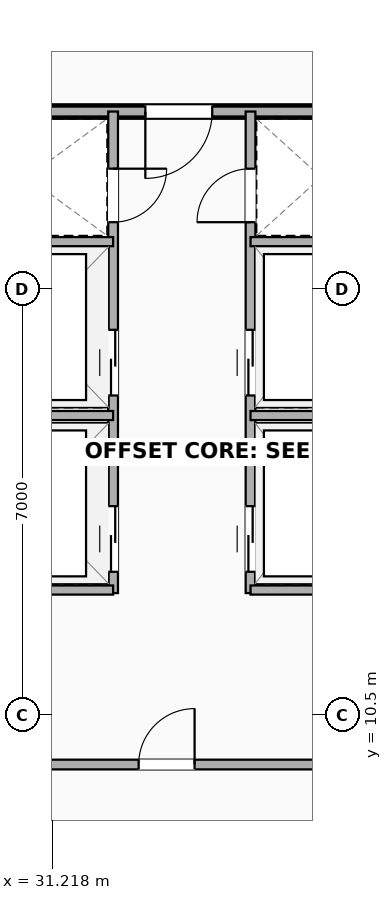
"""IFC4 building model, lengths in metres.
Left out: names, types, materials, properties, quantities, classifications, styles, units other than length and angle.
Written with IfcOpenShell. Run it as: python <this file> out.ifc"""

import sys

from ifc_helpers import new_model, si_unit, direction, frame, frame_2d, origin, place, context, subcontext, project, spatial, rectangle, extrude, element, fill, save


model = new_model("IFC4")
c1 = context("Model", 3, precision=1e-05, world=origin(), true_north=direction((0.0, 1.0)))
c2 = subcontext(c1, "Body", "Model", "MODEL_VIEW")
j1 = project(units=[si_unit("LENGTHUNIT", "METRE"), si_unit("PLANEANGLEUNIT", "RADIAN")], contexts=[c1])
p1 = place(None, origin())
s1 = spatial("IfcSite", under=j1, at=p1, CompositionType="ELEMENT")
p2 = place(p1, origin())
s2 = spatial("IfcBuilding", under=s1, at=p2, CompositionType="ELEMENT")
p3 = place(p2, frame((0.0, 0.0, 91.7)))
s3 = spatial("IfcBuildingStorey", under=s2, at=p3, CompositionType="ELEMENT", Elevation=91.7)
p4 = place(p3, frame((29.2, 20.42, 0.0), z_axis=(0.0, 0.0, 1.0), x_axis=(1.0, 0.0, 0.0)))
e1 = element("IfcWall", 1, at=p4, inside=s3, PredefinedType="PARTITIONING", context=c2, shape_type="SweptSolid", body=[
    extrude(rectangle(XDim=7.8, YDim=0.2, at=frame_2d((3.9, 0.0))), origin(), (0.0, 0.0, 1.0), 2.313),
])
p5 = place(p4, frame((3.55, 0.0, 0.0)))
e2 = element("IfcOpeningElement", 2, at=p5, cuts=e1, PredefinedType="OPENING", context=c2, shape_type="SweptSolid", body=[
    extrude(rectangle(XDim=1.1, YDim=2.15, at=frame_2d((0.55, 1.075))), frame((0.0, 0.11, 0.0), z_axis=(0.0, -1.0, 0.0), x_axis=(1.0, 0.0, 0.0)), (0.0, 0.0, 1.0), 0.22),
])
p6 = place(p3, frame((29.45, 9.68, 0.0), z_axis=(0.0, 0.0, 1.0), x_axis=(1.0, 0.0, 0.0)))
e3 = element("IfcWall", 3, at=p6, inside=s3, PredefinedType="PARTITIONING", context=c2, shape_type="SweptSolid", body=[
    extrude(rectangle(XDim=7.3, YDim=0.16, at=frame_2d((3.65, 0.0))), origin(), (0.0, 0.0, 1.0), 3.24),
])
p7 = place(p6, frame((4.11, 0.0, 0.0), z_axis=(0.0, 0.0, 1.0), x_axis=(-1.0, 0.0, 0.0)))
e4 = element("IfcOpeningElement", 4, at=p7, cuts=e3, PredefinedType="OPENING", context=c2, shape_type="SweptSolid", body=[
    extrude(rectangle(XDim=0.92, YDim=2.08, at=frame_2d((0.46, 1.04))), frame((0.0, 0.09, 0.0), z_axis=(0.0, -1.0, 0.0), x_axis=(1.0, 0.0, 0.0)), (0.0, 0.0, 1.0), 0.18),
])
p8 = place(p3, frame((32.22, 12.5, 0.0), z_axis=(0.0, 0.0, 1.0), x_axis=(0.0, 1.0, 0.0)))
e5 = element("IfcWall", 5, at=p8, inside=s3, PredefinedType="PARTITIONING", context=c2, shape_type="SweptSolid", body=[
    extrude(rectangle(XDim=7.92, YDim=0.16, at=frame_2d((3.96, 0.0))), origin(), (0.0, 0.0, 1.0), 2.614),
])
p9 = place(p8, frame((1.43, 0.0, 0.0), z_axis=(0.0, 0.0, 1.0), x_axis=(-1.0, 0.0, 0.0)))
e6 = element("IfcOpeningElement", 6, at=p9, cuts=e5, PredefinedType="OPENING", context=c2, shape_type="SweptSolid", body=[
    extrude(rectangle(XDim=1.08, YDim=2.16, at=frame_2d((0.54, 1.08))), frame((0.0, 0.09, 0.0), z_axis=(0.0, -1.0, 0.0), x_axis=(1.0, 0.0, 0.0)), (0.0, 0.0, 1.0), 0.18),
])
p10 = place(p8, frame((4.33, 0.0, 0.0), z_axis=(0.0, 0.0, 1.0), x_axis=(-1.0, 0.0, 0.0)))
e7 = element("IfcOpeningElement", 7, at=p10, cuts=e5, PredefinedType="OPENING", context=c2, shape_type="SweptSolid", body=[
    extrude(rectangle(XDim=1.08, YDim=2.16, at=frame_2d((0.54, 1.08))), frame((0.0, 0.09, 0.0), z_axis=(0.0, -1.0, 0.0), x_axis=(1.0, 0.0, 0.0)), (0.0, 0.0, 1.0), 0.18),
])
p11 = place(p8, frame((6.1, 0.0, 0.0)))
e8 = element("IfcOpeningElement", 8, at=p11, cuts=e5, PredefinedType="OPENING", context=c2, shape_type="SweptSolid", body=[
    extrude(rectangle(XDim=0.88, YDim=2.08, at=frame_2d((0.44, 1.04))), frame((0.0, 0.09, 0.0), z_axis=(0.0, -1.0, 0.0), x_axis=(1.0, 0.0, 0.0)), (0.0, 0.0, 1.0), 0.18),
])
p12 = place(p3, frame((34.48, 12.5, 0.0), z_axis=(0.0, 0.0, 1.0), x_axis=(0.0, 1.0, 0.0)))
e9 = element("IfcWall", 9, at=p12, inside=s3, PredefinedType="PARTITIONING", context=c2, shape_type="SweptSolid", body=[
    extrude(rectangle(XDim=7.92, YDim=0.16, at=frame_2d((3.96, 0.0))), origin(), (0.0, 0.0, 1.0), 2.614),
])
p13 = place(p12, frame((0.35, 0.0, 0.0)))
e10 = element("IfcOpeningElement", 10, at=p13, cuts=e9, PredefinedType="OPENING", context=c2, shape_type="SweptSolid", body=[
    extrude(rectangle(XDim=1.08, YDim=2.16, at=frame_2d((0.54, 1.08))), frame((0.0, 0.09, 0.0), z_axis=(0.0, -1.0, 0.0), x_axis=(1.0, 0.0, 0.0)), (0.0, 0.0, 1.0), 0.18),
])
p14 = place(p12, frame((3.25, 0.0, 0.0)))
e11 = element("IfcOpeningElement", 11, at=p14, cuts=e9, PredefinedType="OPENING", context=c2, shape_type="SweptSolid", body=[
    extrude(rectangle(XDim=1.08, YDim=2.16, at=frame_2d((0.54, 1.08))), frame((0.0, 0.09, 0.0), z_axis=(0.0, -1.0, 0.0), x_axis=(1.0, 0.0, 0.0)), (0.0, 0.0, 1.0), 0.18),
])
p15 = place(p12, frame((6.98, 0.0, 0.0), z_axis=(0.0, 0.0, 1.0), x_axis=(-1.0, 0.0, 0.0)))
e12 = element("IfcOpeningElement", 12, at=p15, cuts=e9, PredefinedType="OPENING", context=c2, shape_type="SweptSolid", body=[
    extrude(rectangle(XDim=0.88, YDim=2.08, at=frame_2d((0.44, 1.04))), frame((0.0, 0.09, 0.0), z_axis=(0.0, -1.0, 0.0), x_axis=(1.0, 0.0, 0.0)), (0.0, 0.0, 1.0), 0.18),
])
p16 = place(p3, frame((29.45, 12.55, 0.0), z_axis=(0.0, 0.0, 1.0), x_axis=(1.0, 0.0, 0.0)))
e13 = element("IfcWall", 13, at=p16, inside=s3, PredefinedType="PARTITIONING", context=c2, shape_type="SweptSolid", body=[
    extrude(rectangle(XDim=2.77, YDim=0.15, at=frame_2d((1.385, 0.0))), origin(), (0.0, 0.0, 1.0), 3.24),
])
p17 = place(p3, frame((34.48, 12.55, 0.0), z_axis=(0.0, 0.0, 1.0), x_axis=(1.0, 0.0, 0.0)))
e14 = element("IfcWall", 14, at=p17, inside=s3, PredefinedType="PARTITIONING", context=c2, shape_type="SweptSolid", body=[
    extrude(rectangle(XDim=2.27, YDim=0.15, at=frame_2d((1.135, 0.0))), origin(), (0.0, 0.0, 1.0), 3.24),
])
p18 = place(p3, frame((29.45, 15.42, 0.0), z_axis=(0.0, 0.0, 1.0), x_axis=(1.0, 0.0, 0.0)))
e15 = element("IfcWall", 15, at=p18, inside=s3, PredefinedType="PARTITIONING", context=c2, shape_type="SweptSolid", body=[
    extrude(rectangle(XDim=2.77, YDim=0.15, at=frame_2d((1.385, 0.0))), origin(), (0.0, 0.0, 1.0), 3.24),
])
p19 = place(p3, frame((34.48, 15.42, 0.0), z_axis=(0.0, 0.0, 1.0), x_axis=(1.0, 0.0, 0.0)))
e16 = element("IfcWall", 16, at=p19, inside=s3, PredefinedType="PARTITIONING", context=c2, shape_type="SweptSolid", body=[
    extrude(rectangle(XDim=2.27, YDim=0.15, at=frame_2d((1.135, 0.0))), origin(), (0.0, 0.0, 1.0), 3.24),
])
p20 = place(p3, frame((29.45, 18.28, 0.0), z_axis=(0.0, 0.0, 1.0), x_axis=(1.0, 0.0, 0.0)))
e17 = element("IfcWall", 17, at=p20, inside=s3, PredefinedType="PARTITIONING", context=c2, shape_type="SweptSolid", body=[
    extrude(rectangle(XDim=2.77, YDim=0.15, at=frame_2d((1.385, 0.0))), origin(), (0.0, 0.0, 1.0), 3.24),
])
p21 = place(p3, frame((34.48, 18.28, 0.0), z_axis=(0.0, 0.0, 1.0), x_axis=(1.0, 0.0, 0.0)))
e18 = element("IfcWall", 18, at=p21, inside=s3, PredefinedType="PARTITIONING", context=c2, shape_type="SweptSolid", body=[
    extrude(rectangle(XDim=2.27, YDim=0.15, at=frame_2d((1.135, 0.0))), origin(), (0.0, 0.0, 1.0), 3.24),
])
p22 = place(p5, origin())
e19 = element("IfcDoor", 19, at=p22, inside=s3, OperationType="SINGLE_SWING_LEFT", PredefinedType="DOOR", context=c2, shape_type="SweptSolid", body=[
    extrude(rectangle(XDim=1.1, YDim=2.15, at=frame_2d((0.55, 1.075))), frame((0.0, 0.025, 0.0), z_axis=(0.0, -1.0, 0.0), x_axis=(1.0, 0.0, 0.0)), (0.0, 0.0, 1.0), 0.05),
])
fill(e2, e19)
p23 = place(p7, origin())
e20 = element("IfcDoor", 20, at=p23, inside=s3, OperationType="SINGLE_SWING_RIGHT", PredefinedType="DOOR", context=c2, shape_type="SweptSolid", body=[
    extrude(rectangle(XDim=0.92, YDim=2.08, at=frame_2d((0.46, 1.04))), frame((0.0, 0.025, 0.0), z_axis=(0.0, -1.0, 0.0), x_axis=(1.0, 0.0, 0.0)), (0.0, 0.0, 1.0), 0.05),
])
fill(e4, e20)
p24 = place(p9, origin())
e21 = element("IfcDoor", 21, at=p24, inside=s3, OperationType="DOUBLE_DOOR_SLIDING", PredefinedType="DOOR", context=c2, shape_type="SweptSolid", body=[
    extrude(rectangle(XDim=1.08, YDim=2.16, at=frame_2d((0.54, 1.08))), frame((0.0, 0.025, 0.0), z_axis=(0.0, -1.0, 0.0), x_axis=(1.0, 0.0, 0.0)), (0.0, 0.0, 1.0), 0.05),
])
fill(e6, e21)
p25 = place(p10, origin())
e22 = element("IfcDoor", 22, at=p25, inside=s3, OperationType="DOUBLE_DOOR_SLIDING", PredefinedType="DOOR", context=c2, shape_type="SweptSolid", body=[
    extrude(rectangle(XDim=1.08, YDim=2.16, at=frame_2d((0.54, 1.08))), frame((0.0, 0.025, 0.0), z_axis=(0.0, -1.0, 0.0), x_axis=(1.0, 0.0, 0.0)), (0.0, 0.0, 1.0), 0.05),
])
fill(e7, e22)
p26 = place(p11, origin())
e23 = element("IfcDoor", 23, at=p26, inside=s3, OperationType="SINGLE_SWING_RIGHT", PredefinedType="DOOR", context=c2, shape_type="SweptSolid", body=[
    extrude(rectangle(XDim=0.88, YDim=2.08, at=frame_2d((0.44, 1.04))), frame((0.0, 0.025, 0.0), z_axis=(0.0, -1.0, 0.0), x_axis=(1.0, 0.0, 0.0)), (0.0, 0.0, 1.0), 0.05),
])
fill(e8, e23)
p27 = place(p13, origin())
e24 = element("IfcDoor", 24, at=p27, inside=s3, OperationType="DOUBLE_DOOR_SLIDING", PredefinedType="DOOR", context=c2, shape_type="SweptSolid", body=[
    extrude(rectangle(XDim=1.08, YDim=2.16, at=frame_2d((0.54, 1.08))), frame((0.0, 0.025, 0.0), z_axis=(0.0, -1.0, 0.0), x_axis=(1.0, 0.0, 0.0)), (0.0, 0.0, 1.0), 0.05),
])
fill(e10, e24)
p28 = place(p14, origin())
e25 = element("IfcDoor", 25, at=p28, inside=s3, OperationType="DOUBLE_DOOR_SLIDING", PredefinedType="DOOR", context=c2, shape_type="SweptSolid", body=[
    extrude(rectangle(XDim=1.08, YDim=2.16, at=frame_2d((0.54, 1.08))), frame((0.0, 0.025, 0.0), z_axis=(0.0, -1.0, 0.0), x_axis=(1.0, 0.0, 0.0)), (0.0, 0.0, 1.0), 0.05),
])
fill(e11, e25)
p29 = place(p15, origin())
e26 = element("IfcDoor", 26, at=p29, inside=s3, OperationType="SINGLE_SWING_LEFT", PredefinedType="DOOR", context=c2, shape_type="SweptSolid", body=[
    extrude(rectangle(XDim=0.88, YDim=2.08, at=frame_2d((0.44, 1.04))), frame((0.0, 0.025, 0.0), z_axis=(0.0, -1.0, 0.0), x_axis=(1.0, 0.0, 0.0)), (0.0, 0.0, 1.0), 0.05),
])
fill(e12, e26)
save(model, sys.argv[1])
